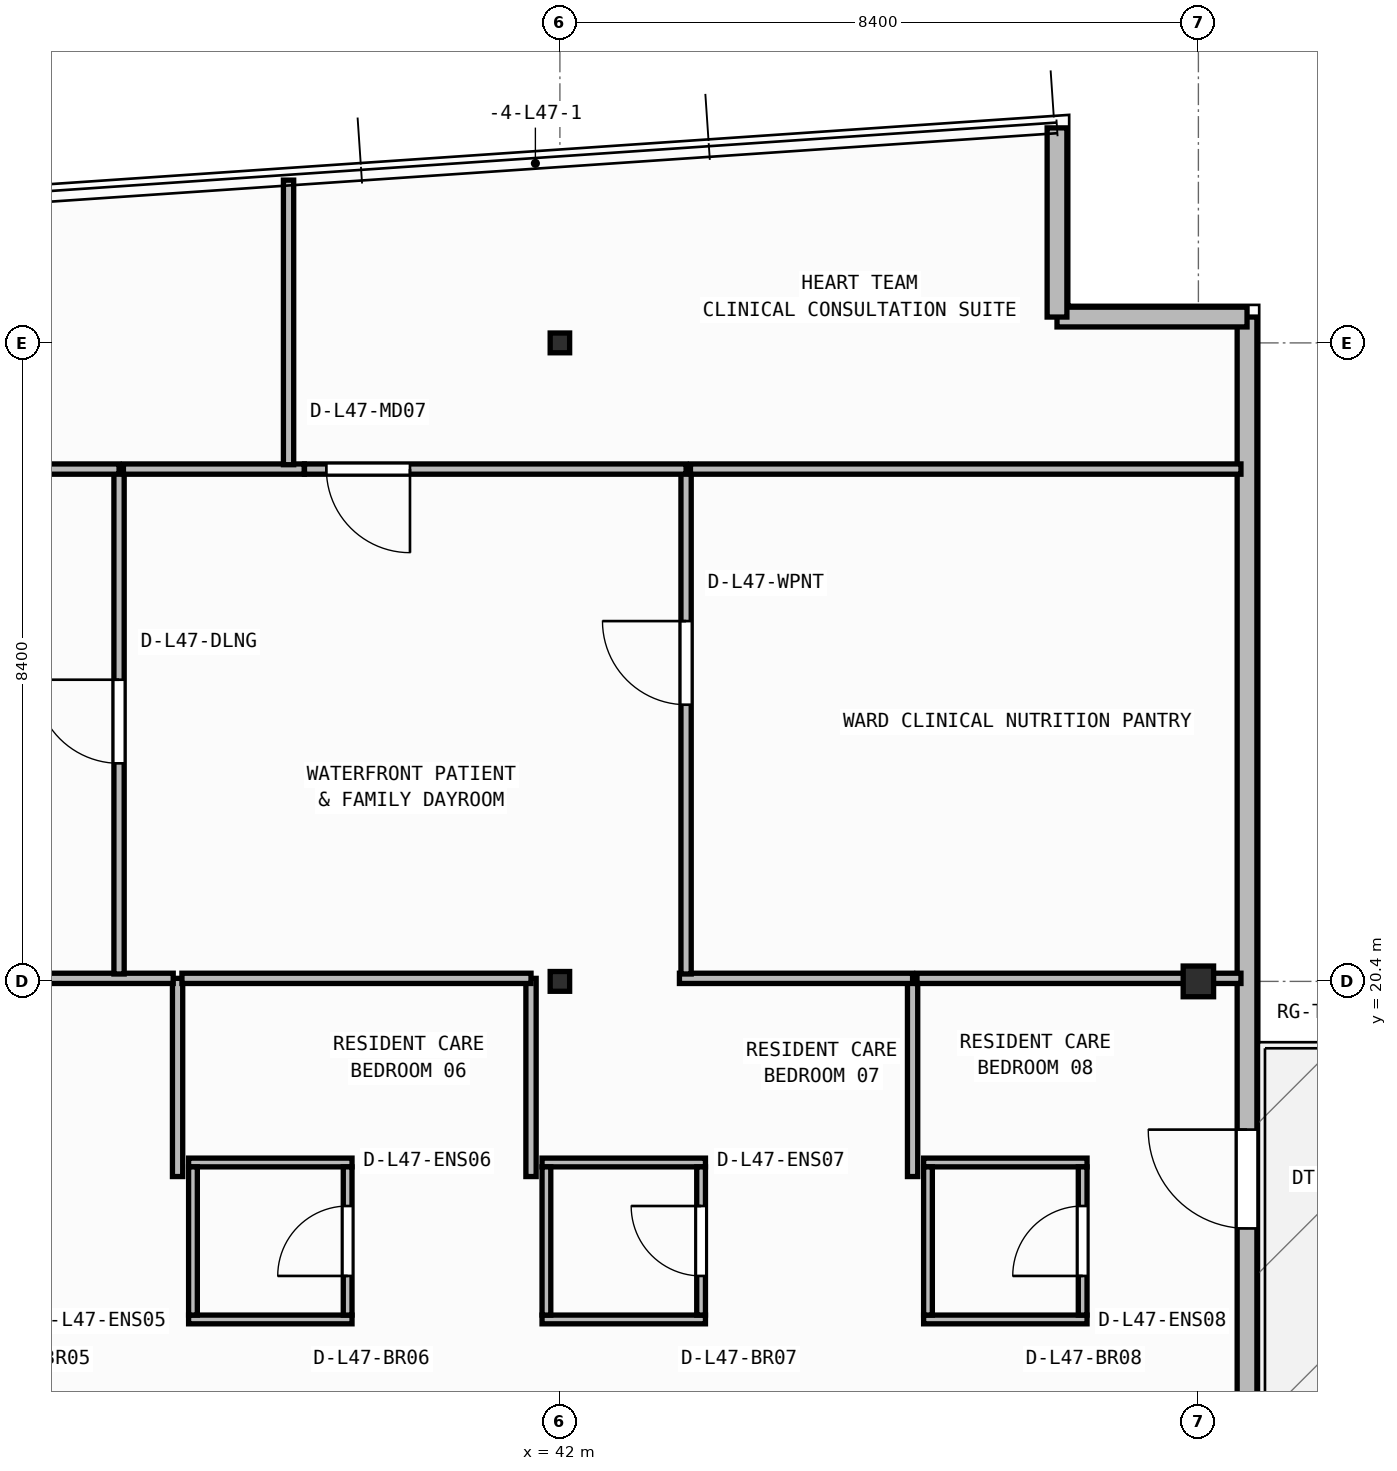
"""IFC4 building model, lengths in metres.
Left out: names, types, materials, properties, quantities, classifications, styles, units other than length and angle.
Written with IfcOpenShell. Run it as: python <this file> out.ifc"""

import sys

from ifc_helpers import new_model, si_unit, direction, frame, frame_2d, origin, origin_2d, place, context, subcontext, project, spatial, rectangle, i_section, extrude, element, fill, save


model = new_model("IFC4")
c1 = context("Model", 3, precision=1e-05, world=origin(), true_north=direction((0.0, 1.0)))
c2 = subcontext(c1, "Body", "Model", "MODEL_VIEW")
j1 = project(units=[si_unit("LENGTHUNIT", "METRE"), si_unit("PLANEANGLEUNIT", "RADIAN")], contexts=[c1])
p1 = place(None, origin())
s1 = spatial("IfcSite", under=j1, at=p1, CompositionType="ELEMENT")
p2 = place(p1, origin())
s2 = spatial("IfcBuilding", under=s1, at=p2, CompositionType="ELEMENT")
p3 = place(p2, frame((0.0, 0.0, 192.1)))
s3 = spatial("IfcBuildingStorey", under=s2, at=p3, CompositionType="ELEMENT", Elevation=192.1)
p4 = place(p3, frame((42.0, 20.4, 0.0), z_axis=(0.0, 0.0, 1.0), x_axis=(1.0, 0.0, 0.0)))
e1 = element("IfcColumn", 1, at=p4, inside=s3, PredefinedType="COLUMN", context=c2, shape_type="SweptSolid", body=[
    extrude(i_section(OverallWidth=0.256, OverallDepth=0.26, WebThickness=0.01, FlangeThickness=0.017, FilletRadius=0.013, at=origin_2d()), origin(), (0.0, 0.0, 1.0), 3.95),
])
p5 = place(p3, frame((50.4, 20.4, 0.0), z_axis=(0.0, 0.0, 1.0), x_axis=(1.0, 0.0, 0.0)))
e2 = element("IfcColumn", 2, at=p5, inside=s3, PredefinedType="COLUMN", context=c2, shape_type="SweptSolid", body=[
    extrude(i_section(OverallWidth=0.4, OverallDepth=0.404, WebThickness=0.02, FlangeThickness=0.032, at=origin_2d()), origin(), (0.0, 0.0, 1.0), 3.95),
])
p6 = place(p3, frame((42.0, 28.8, 0.0), z_axis=(0.0, 0.0, 1.0), x_axis=(1.0, 0.0, 0.0)))
e3 = element("IfcColumn", 3, at=p6, inside=s3, PredefinedType="COLUMN", context=c2, shape_type="SweptSolid", body=[
    extrude(i_section(OverallWidth=0.256, OverallDepth=0.26, WebThickness=0.01, FlangeThickness=0.017, FilletRadius=0.013, at=origin_2d()), origin(), (0.0, 0.0, 1.0), 3.95),
])
p7 = place(p3, frame((51.04, 6.46, 0.0), z_axis=(0.0, 0.0, 1.0), x_axis=(0.0, 1.0, 0.0)))
e4 = element("IfcWall", 4, at=p7, inside=s3, PredefinedType="STANDARD", context=c2, shape_type="SweptSolid", body=[
    extrude(rectangle(XDim=22.68, YDim=0.26, at=frame_2d((11.34, 0.0))), origin(), (0.0, 0.0, 1.0), 3.71),
])
p8 = place(p7, frame((10.69, 0.0, 0.0)))
e5 = element("IfcOpeningElement", 5, at=p8, cuts=e4, PredefinedType="OPENING", context=c2, shape_type="SweptSolid", body=[
    extrude(rectangle(XDim=1.3, YDim=2.15, at=frame_2d((0.65, 1.075))), frame((0.0, 0.14, 0.0), z_axis=(0.0, -1.0, 0.0), x_axis=(1.0, 0.0, 0.0)), (0.0, 0.0, 1.0), 0.28),
])
p9 = place(p3, frame((51.04, 29.14, 0.0), z_axis=(0.0, 0.0, 1.0), x_axis=(-1.0, 0.0, 0.0)))
e6 = element("IfcWall", 6, at=p9, inside=s3, PredefinedType="STANDARD", context=c2, shape_type="SweptSolid", body=[
    extrude(rectangle(XDim=2.5, YDim=0.26, at=frame_2d((1.25, 0.0))), origin(), (0.0, 0.0, 1.0), 3.71),
])
p10 = place(p3, frame((48.54, 29.14, 0.0), z_axis=(0.0, 0.0, 1.0), x_axis=(0.0, 1.0, 0.0)))
e7 = element("IfcWall", 7, at=p10, inside=s3, PredefinedType="STANDARD", context=c2, shape_type="SweptSolid", body=[
    extrude(rectangle(XDim=2.489, YDim=0.26, at=frame_2d((1.245, 0.0))), origin(), (0.0, 0.0, 1.0), 3.71),
])
p11 = place(p3, frame((37.115, 15.952, 0.0), z_axis=(0.0, 0.0, 1.0), x_axis=(1.0, 0.0, 0.0)))
e8 = element("IfcWall", 8, at=p11, inside=s3, PredefinedType="PARTITIONING", context=c2, shape_type="SweptSolid", body=[
    extrude(rectangle(XDim=2.15, YDim=0.115, at=frame_2d((1.075, 0.0))), origin(), (0.0, 0.0, 1.0), 3.329),
])
p12 = place(p3, frame((37.115, 18.018, 0.0), z_axis=(0.0, 0.0, 1.0), x_axis=(1.0, 0.0, 0.0)))
e9 = element("IfcWall", 9, at=p12, inside=s3, PredefinedType="PARTITIONING", context=c2, shape_type="SweptSolid", body=[
    extrude(rectangle(XDim=2.15, YDim=0.115, at=frame_2d((1.075, 0.0))), origin(), (0.0, 0.0, 1.0), 3.71),
])
p13 = place(p3, frame((37.173, 16.01, 0.0), z_axis=(0.0, 0.0, 1.0), x_axis=(0.0, 1.0, 0.0)))
e10 = element("IfcWall", 10, at=p13, inside=s3, PredefinedType="PARTITIONING", context=c2, shape_type="SweptSolid", body=[
    extrude(rectangle(XDim=1.95, YDim=0.115, at=frame_2d((0.975, 0.0))), origin(), (0.0, 0.0, 1.0), 3.71),
])
p14 = place(p3, frame((39.208, 16.01, 0.0), z_axis=(0.0, 0.0, 1.0), x_axis=(0.0, 1.0, 0.0)))
e11 = element("IfcWall", 11, at=p14, inside=s3, PredefinedType="PARTITIONING", context=c2, shape_type="SweptSolid", body=[
    extrude(rectangle(XDim=1.95, YDim=0.115, at=frame_2d((0.975, 0.0))), origin(), (0.0, 0.0, 1.0), 3.71),
])
p15 = place(p14, frame((0.515, 0.0, 0.0)))
e12 = element("IfcOpeningElement", 12, at=p15, cuts=e11, PredefinedType="OPENING", context=c2, shape_type="SweptSolid", body=[
    extrude(rectangle(XDim=0.92, YDim=2.1, at=frame_2d((0.46, 1.05))), frame((0.0, 0.067, 0.0), z_axis=(0.0, -1.0, 0.0), x_axis=(1.0, 0.0, 0.0)), (0.0, 0.0, 1.0), 0.135),
])
p16 = place(p3, frame((41.765, 15.952, 0.0), z_axis=(0.0, 0.0, 1.0), x_axis=(1.0, 0.0, 0.0)))
e13 = element("IfcWall", 13, at=p16, inside=s3, PredefinedType="PARTITIONING", context=c2, shape_type="SweptSolid", body=[
    extrude(rectangle(XDim=2.15, YDim=0.115, at=frame_2d((1.075, 0.0))), origin(), (0.0, 0.0, 1.0), 3.329),
])
p17 = place(p3, frame((41.765, 18.018, 0.0), z_axis=(0.0, 0.0, 1.0), x_axis=(1.0, 0.0, 0.0)))
e14 = element("IfcWall", 14, at=p17, inside=s3, PredefinedType="PARTITIONING", context=c2, shape_type="SweptSolid", body=[
    extrude(rectangle(XDim=2.15, YDim=0.115, at=frame_2d((1.075, 0.0))), origin(), (0.0, 0.0, 1.0), 3.71),
])
p18 = place(p3, frame((41.823, 16.01, 0.0), z_axis=(0.0, 0.0, 1.0), x_axis=(0.0, 1.0, 0.0)))
e15 = element("IfcWall", 15, at=p18, inside=s3, PredefinedType="PARTITIONING", context=c2, shape_type="SweptSolid", body=[
    extrude(rectangle(XDim=1.95, YDim=0.115, at=frame_2d((0.975, 0.0))), origin(), (0.0, 0.0, 1.0), 3.152),
])
p19 = place(p3, frame((43.857, 16.01, 0.0), z_axis=(0.0, 0.0, 1.0), x_axis=(0.0, 1.0, 0.0)))
e16 = element("IfcWall", 16, at=p19, inside=s3, PredefinedType="PARTITIONING", context=c2, shape_type="SweptSolid", body=[
    extrude(rectangle(XDim=1.95, YDim=0.115, at=frame_2d((0.975, 0.0))), origin(), (0.0, 0.0, 1.0), 3.71),
])
p20 = place(p19, frame((0.515, 0.0, 0.0)))
e17 = element("IfcOpeningElement", 17, at=p20, cuts=e16, PredefinedType="OPENING", context=c2, shape_type="SweptSolid", body=[
    extrude(rectangle(XDim=0.92, YDim=2.1, at=frame_2d((0.46, 1.05))), frame((0.0, 0.067, 0.0), z_axis=(0.0, -1.0, 0.0), x_axis=(1.0, 0.0, 0.0)), (0.0, 0.0, 1.0), 0.135),
])
p21 = place(p3, frame((46.785, 15.952, 0.0), z_axis=(0.0, 0.0, 1.0), x_axis=(1.0, 0.0, 0.0)))
e18 = element("IfcWall", 18, at=p21, inside=s3, PredefinedType="PARTITIONING", context=c2, shape_type="SweptSolid", body=[
    extrude(rectangle(XDim=2.15, YDim=0.115, at=frame_2d((1.075, 0.0))), origin(), (0.0, 0.0, 1.0), 3.329),
])
p22 = place(p3, frame((46.785, 18.018, 0.0), z_axis=(0.0, 0.0, 1.0), x_axis=(1.0, 0.0, 0.0)))
e19 = element("IfcWall", 19, at=p22, inside=s3, PredefinedType="PARTITIONING", context=c2, shape_type="SweptSolid", body=[
    extrude(rectangle(XDim=2.15, YDim=0.115, at=frame_2d((1.075, 0.0))), origin(), (0.0, 0.0, 1.0), 3.71),
])
p23 = place(p3, frame((46.843, 16.01, 0.0), z_axis=(0.0, 0.0, 1.0), x_axis=(0.0, 1.0, 0.0)))
e20 = element("IfcWall", 20, at=p23, inside=s3, PredefinedType="PARTITIONING", context=c2, shape_type="SweptSolid", body=[
    extrude(rectangle(XDim=1.95, YDim=0.115, at=frame_2d((0.975, 0.0))), origin(), (0.0, 0.0, 1.0), 3.71),
])
p24 = place(p3, frame((48.877, 16.01, 0.0), z_axis=(0.0, 0.0, 1.0), x_axis=(0.0, 1.0, 0.0)))
e21 = element("IfcWall", 21, at=p24, inside=s3, PredefinedType="PARTITIONING", context=c2, shape_type="SweptSolid", body=[
    extrude(rectangle(XDim=1.95, YDim=0.115, at=frame_2d((0.975, 0.0))), origin(), (0.0, 0.0, 1.0), 3.71),
])
p25 = place(p24, frame((0.515, 0.0, 0.0)))
e22 = element("IfcOpeningElement", 22, at=p25, cuts=e21, PredefinedType="OPENING", context=c2, shape_type="SweptSolid", body=[
    extrude(rectangle(XDim=0.92, YDim=2.1, at=frame_2d((0.46, 1.05))), frame((0.0, 0.067, 0.0), z_axis=(0.0, -1.0, 0.0), x_axis=(1.0, 0.0, 0.0)), (0.0, 0.0, 1.0), 0.135),
])
p26 = place(p3, frame((36.97, 17.833, 0.0), z_axis=(0.0, 0.0, 1.0), x_axis=(0.0, 1.0, 0.0)))
e23 = element("IfcWall", 23, at=p26, inside=s3, PredefinedType="PARTITIONING", context=c2, shape_type="SweptSolid", body=[
    extrude(rectangle(XDim=2.607, YDim=0.135, at=frame_2d((1.304, 0.0))), origin(), (0.0, 0.0, 1.0), 3.71),
])
p27 = place(p3, frame((36.913, 20.44, 0.0), z_axis=(0.0, 0.0, 1.0), x_axis=(-1.0, 0.0, 0.0)))
e24 = element("IfcWall", 24, at=p27, inside=s3, PredefinedType="PARTITIONING", context=c2, shape_type="SweptSolid", body=[
    extrude(rectangle(XDim=4.165, YDim=0.135, at=frame_2d((2.083, 0.0))), origin(), (0.0, 0.0, 1.0), 3.152),
])
p28 = place(p3, frame((41.62, 17.833, 0.0), z_axis=(0.0, 0.0, 1.0), x_axis=(0.0, 1.0, 0.0)))
e25 = element("IfcWall", 25, at=p28, inside=s3, PredefinedType="PARTITIONING", context=c2, shape_type="SweptSolid", body=[
    extrude(rectangle(XDim=2.607, YDim=0.135, at=frame_2d((1.304, 0.0))), origin(), (0.0, 0.0, 1.0), 3.152),
])
p29 = place(p3, frame((41.62, 20.44, 0.0), z_axis=(0.0, 0.0, 1.0), x_axis=(-1.0, 0.0, 0.0)))
e26 = element("IfcWall", 26, at=p29, inside=s3, PredefinedType="PARTITIONING", context=c2, shape_type="SweptSolid", body=[
    extrude(rectangle(XDim=4.593, YDim=0.135, at=frame_2d((2.296, 0.0))), origin(), (0.0, 0.0, 1.0), 3.152),
])
p30 = place(p3, frame((46.64, 17.833, 0.0), z_axis=(0.0, 0.0, 1.0), x_axis=(0.0, 1.0, 0.0)))
e27 = element("IfcWall", 27, at=p30, inside=s3, PredefinedType="PARTITIONING", context=c2, shape_type="SweptSolid", body=[
    extrude(rectangle(XDim=2.607, YDim=0.135, at=frame_2d((1.304, 0.0))), origin(), (0.0, 0.0, 1.0), 3.71),
])
p31 = place(p3, frame((46.64, 20.44, 0.0), z_axis=(0.0, 0.0, 1.0), x_axis=(-1.0, 0.0, 0.0)))
e28 = element("IfcWall", 28, at=p31, inside=s3, PredefinedType="PARTITIONING", context=c2, shape_type="SweptSolid", body=[
    extrude(rectangle(XDim=3.067, YDim=0.135, at=frame_2d((1.534, 0.0))), origin(), (0.0, 0.0, 1.0), 3.152),
])
p32 = place(p3, frame((50.96, 20.44, 0.0), z_axis=(0.0, 0.0, 1.0), x_axis=(-1.0, 0.0, 0.0)))
e29 = element("IfcWall", 29, at=p32, inside=s3, PredefinedType="PARTITIONING", context=c2, shape_type="SweptSolid", body=[
    extrude(rectangle(XDim=4.262, YDim=0.135, at=frame_2d((2.131, 0.0))), origin(), (0.0, 0.0, 1.0), 3.152),
])
p33 = place(p3, frame((36.2, 20.498, 0.0), z_axis=(0.0, 0.0, 1.0), x_axis=(0.0, 1.0, 0.0)))
e30 = element("IfcWall", 30, at=p33, inside=s3, PredefinedType="PARTITIONING", context=c2, shape_type="SweptSolid", body=[
    extrude(rectangle(XDim=6.642, YDim=0.135, at=frame_2d((3.321, 0.0))), origin(), (0.0, 0.0, 1.0), 3.71),
])
p34 = place(p33, frame((2.771, 0.0, 0.0)))
e31 = element("IfcOpeningElement", 31, at=p34, cuts=e30, PredefinedType="OPENING", context=c2, shape_type="SweptSolid", body=[
    extrude(rectangle(XDim=1.1, YDim=2.1, at=frame_2d((0.55, 1.05))), frame((0.0, 0.077, 0.0), z_axis=(0.0, -1.0, 0.0), x_axis=(1.0, 0.0, 0.0)), (0.0, 0.0, 1.0), 0.155),
])
p35 = place(p3, frame((36.2, 27.14, 0.0), z_axis=(0.0, 0.0, 1.0), x_axis=(-1.0, 0.0, 0.0)))
e32 = element("IfcWall", 32, at=p35, inside=s3, PredefinedType="PARTITIONING", context=c2, shape_type="SweptSolid", body=[
    extrude(rectangle(XDim=19.68, YDim=0.135, at=frame_2d((9.84, 0.0))), origin(), (0.0, 0.0, 1.0), 3.71),
])
p36 = place(p35, frame((14.744, 0.0, 0.0)))
e33 = element("IfcOpeningElement", 33, at=p36, cuts=e32, PredefinedType="OPENING", context=c2, shape_type="SweptSolid", body=[
    extrude(rectangle(XDim=1.1, YDim=2.1, at=frame_2d((0.55, 1.05))), frame((0.0, 0.077, 0.0), z_axis=(0.0, -1.0, 0.0), x_axis=(1.0, 0.0, 0.0)), (0.0, 0.0, 1.0), 0.155),
])
p37 = place(p3, frame((43.66, 20.498, 0.0), z_axis=(0.0, 0.0, 1.0), x_axis=(0.0, 1.0, 0.0)))
e34 = element("IfcWall", 34, at=p37, inside=s3, PredefinedType="PARTITIONING", context=c2, shape_type="SweptSolid", body=[
    extrude(rectangle(XDim=6.642, YDim=0.135, at=frame_2d((3.321, 0.0))), origin(), (0.0, 0.0, 1.0), 3.71),
])
p38 = place(p37, frame((3.542, 0.0, 0.0)))
e35 = element("IfcOpeningElement", 35, at=p38, cuts=e34, PredefinedType="OPENING", context=c2, shape_type="SweptSolid", body=[
    extrude(rectangle(XDim=1.1, YDim=2.1, at=frame_2d((0.55, 1.05))), frame((0.0, 0.077, 0.0), z_axis=(0.0, -1.0, 0.0), x_axis=(1.0, 0.0, 0.0)), (0.0, 0.0, 1.0), 0.155),
])
p39 = place(p3, frame((38.637, 27.14, 0.0), z_axis=(0.0, 0.0, 1.0), x_axis=(-1.0, 0.0, 0.0)))
e36 = element("IfcWall", 36, at=p39, inside=s3, PredefinedType="PARTITIONING", context=c2, shape_type="SweptSolid", body=[
    extrude(rectangle(XDim=2.38, YDim=0.135, at=frame_2d((1.19, 0.0))), origin(), (0.0, 0.0, 1.0), 3.71),
])
p40 = place(p3, frame((43.66, 27.14, 0.0), z_axis=(0.0, 0.0, 1.0), x_axis=(-1.0, 0.0, 0.0)))
e37 = element("IfcWall", 37, at=p40, inside=s3, PredefinedType="PARTITIONING", context=c2, shape_type="SweptSolid", body=[
    extrude(rectangle(XDim=5.021, YDim=0.135, at=frame_2d((2.51, 0.0))), origin(), (0.0, 0.0, 1.0), 3.71),
])
p41 = place(p40, frame((3.633, 0.0, 0.0)))
e38 = element("IfcOpeningElement", 38, at=p41, cuts=e37, PredefinedType="OPENING", context=c2, shape_type="SweptSolid", body=[
    extrude(rectangle(XDim=1.1, YDim=2.1, at=frame_2d((0.55, 1.05))), frame((0.0, 0.077, 0.0), z_axis=(0.0, -1.0, 0.0), x_axis=(1.0, 0.0, 0.0)), (0.0, 0.0, 1.0), 0.155),
])
p42 = place(p3, frame((50.96, 27.14, 0.0), z_axis=(0.0, 0.0, 1.0), x_axis=(-1.0, 0.0, 0.0)))
e39 = element("IfcWall", 39, at=p42, inside=s3, PredefinedType="PARTITIONING", context=c2, shape_type="SweptSolid", body=[
    extrude(rectangle(XDim=7.242, YDim=0.135, at=frame_2d((3.621, 0.0))), origin(), (0.0, 0.0, 1.0), 3.71),
])
p43 = place(p3, frame((38.43, 27.198, 0.0), z_axis=(0.0, 0.0, 1.0), x_axis=(0.0, 1.0, 0.0)))
e40 = element("IfcWall", 40, at=p43, inside=s3, PredefinedType="PARTITIONING", context=c2, shape_type="SweptSolid", body=[
    extrude(rectangle(XDim=3.744, YDim=0.135, at=frame_2d((1.872, 0.0))), origin(), (0.0, 0.0, 1.0), 3.71),
])
p44 = place(p8, origin())
e41 = element("IfcDoor", 41, at=p44, inside=s3, OperationType="SINGLE_SWING_RIGHT", PredefinedType="DOOR", context=c2, shape_type="SweptSolid", body=[
    extrude(rectangle(XDim=1.3, YDim=2.15, at=frame_2d((0.65, 1.075))), frame((0.0, 0.025, 0.0), z_axis=(0.0, -1.0, 0.0), x_axis=(1.0, 0.0, 0.0)), (0.0, 0.0, 1.0), 0.05),
])
fill(e5, e41)
p45 = place(p15, origin())
e42 = element("IfcDoor", 42, at=p45, inside=s3, OperationType="SINGLE_SWING_LEFT", PredefinedType="DOOR", context=c2, shape_type="SweptSolid", body=[
    extrude(rectangle(XDim=0.92, YDim=2.1, at=frame_2d((0.46, 1.05))), frame((0.0, 0.025, 0.0), z_axis=(0.0, -1.0, 0.0), x_axis=(1.0, 0.0, 0.0)), (0.0, 0.0, 1.0), 0.05),
])
fill(e12, e42)
p46 = place(p20, origin())
e43 = element("IfcDoor", 43, at=p46, inside=s3, OperationType="SINGLE_SWING_RIGHT", PredefinedType="DOOR", context=c2, shape_type="SweptSolid", body=[
    extrude(rectangle(XDim=0.92, YDim=2.1, at=frame_2d((0.46, 1.05))), frame((0.0, 0.025, 0.0), z_axis=(0.0, -1.0, 0.0), x_axis=(1.0, 0.0, 0.0)), (0.0, 0.0, 1.0), 0.05),
])
fill(e17, e43)
p47 = place(p25, origin())
e44 = element("IfcDoor", 44, at=p47, inside=s3, OperationType="SINGLE_SWING_LEFT", PredefinedType="DOOR", context=c2, shape_type="SweptSolid", body=[
    extrude(rectangle(XDim=0.92, YDim=2.1, at=frame_2d((0.46, 1.05))), frame((0.0, 0.025, 0.0), z_axis=(0.0, -1.0, 0.0), x_axis=(1.0, 0.0, 0.0)), (0.0, 0.0, 1.0), 0.05),
])
fill(e22, e44)
p48 = place(p34, origin())
e45 = element("IfcDoor", 45, at=p48, inside=s3, OperationType="SINGLE_SWING_RIGHT", PredefinedType="DOOR", context=c2, shape_type="SweptSolid", body=[
    extrude(rectangle(XDim=1.1, YDim=2.1, at=frame_2d((0.55, 1.05))), frame((0.0, 0.025, 0.0), z_axis=(0.0, -1.0, 0.0), x_axis=(1.0, 0.0, 0.0)), (0.0, 0.0, 1.0), 0.05),
])
fill(e31, e45)
p49 = place(p38, origin())
e46 = element("IfcDoor", 46, at=p49, inside=s3, OperationType="SINGLE_SWING_RIGHT", PredefinedType="DOOR", context=c2, shape_type="SweptSolid", body=[
    extrude(rectangle(XDim=1.1, YDim=2.1, at=frame_2d((0.55, 1.05))), frame((0.0, 0.025, 0.0), z_axis=(0.0, -1.0, 0.0), x_axis=(1.0, 0.0, 0.0)), (0.0, 0.0, 1.0), 0.05),
])
fill(e35, e46)
p50 = place(p41, origin())
e47 = element("IfcDoor", 47, at=p50, inside=s3, OperationType="SINGLE_SWING_LEFT", PredefinedType="DOOR", context=c2, shape_type="SweptSolid", body=[
    extrude(rectangle(XDim=1.1, YDim=2.1, at=frame_2d((0.55, 1.05))), frame((0.0, 0.025, 0.0), z_axis=(0.0, -1.0, 0.0), x_axis=(1.0, 0.0, 0.0)), (0.0, 0.0, 1.0), 0.05),
])
fill(e38, e47)
save(model, sys.argv[1])
